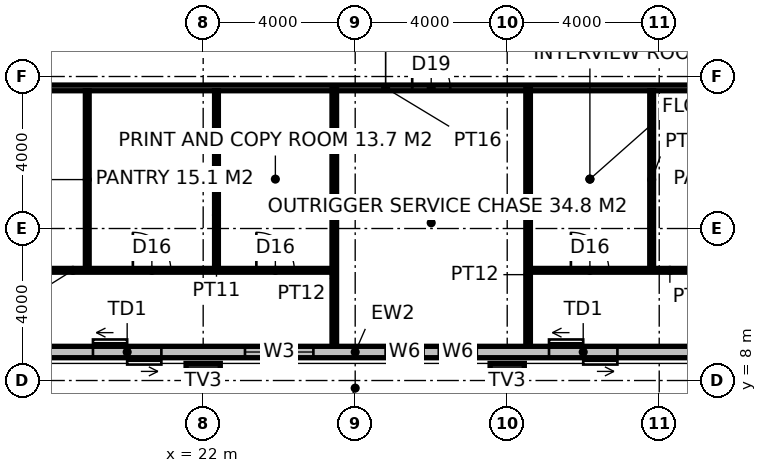
"""IFC4 building model, lengths in metres.
Left out: names, types, materials, properties, quantities, classifications, styles, units other than length and angle.
Written with IfcOpenShell. Run it as: python <this file> out.ifc"""

import sys

from ifc_helpers import new_model, si_unit, direction, frame, frame_2d, origin, origin_2d, place, context, subcontext, project, spatial, rectangle, hollow_rectangle, extrude, element, fill, save


model = new_model("IFC4")
c1 = context("Model", 3, precision=1e-05, world=origin(), true_north=direction((0.0, 1.0)))
c2 = subcontext(c1, "Body", "Model", "MODEL_VIEW")
j1 = project(units=[si_unit("LENGTHUNIT", "METRE"), si_unit("PLANEANGLEUNIT", "RADIAN")], contexts=[c1])
p1 = place(None, origin())
s1 = spatial("IfcSite", under=j1, at=p1, CompositionType="ELEMENT")
p2 = place(p1, origin())
s2 = spatial("IfcBuilding", under=s1, at=p2, CompositionType="ELEMENT")
p3 = place(p2, frame((0.0, 0.0, 171.8)))
s3 = spatial("IfcBuildingStorey", under=s2, at=p3, CompositionType="ELEMENT", Elevation=171.8)
for number, where, z_axis, x_axis in (
    (1, (22.0, 8.0, 0.0), (0.0, 0.0, 1.0), (1.0, 0.0, 0.0)),
    (2, (30.0, 8.0, 0.0), (0.0, 0.0, 1.0), (1.0, 0.0, 0.0)),
):
    element("IfcColumn", number, at=place(p3, frame(where, z_axis=z_axis, x_axis=x_axis)), inside=s3, PredefinedType="USERDEFINED", context=c2, shape_type="SweptSolid", body=[
        extrude(hollow_rectangle(XDim=0.9, YDim=0.9, WallThickness=0.08, at=origin_2d()), origin(), (0.0, 0.0, 1.0), 4.0),
    ])
p4 = place(p3, frame((15.775, 15.7, 0.0), z_axis=(0.0, 0.0, 1.0), x_axis=(1.0, 0.0, 0.0)))
e3 = element("IfcWall", 3, at=p4, inside=s3, PredefinedType="PARTITIONING", context=c2, shape_type="SweptSolid", body=[
    extrude(rectangle(XDim=22.05, YDim=0.15, at=frame_2d((11.025, 0.0))), origin(), (0.0, 0.0, 1.0), 3.85),
])
p5 = place(p4, frame((11.725, 0.0, 0.0)))
e4 = element("IfcOpeningElement", 4, at=p5, cuts=e3, PredefinedType="OPENING", context=c2, shape_type="SweptSolid", body=[
    extrude(rectangle(XDim=1.0, YDim=2.2, at=frame_2d((0.5, 1.1))), frame((0.0, 0.085, 0.0), z_axis=(0.0, -1.0, 0.0), x_axis=(1.0, 0.0, 0.0)), (0.0, 0.0, 1.0), 0.17),
])
for number, where, z_axis, x_axis in (
    (5, (25.45, 8.68, 0.0), (0.0, 0.0, 1.0), (0.0, 1.0, 0.0)),
    (6, (30.55, 8.68, 0.0), (0.0, 0.0, 1.0), (0.0, 1.0, 0.0)),
):
    element("IfcWall", number, at=place(p3, frame(where, z_axis=z_axis, x_axis=x_axis)), inside=s3, PredefinedType="PARTITIONING", context=c2, shape_type="SweptSolid", body=[
        extrude(rectangle(XDim=7.02, YDim=0.12, at=frame_2d((3.51, 0.0))), origin(), (0.0, 0.0, 1.0), 2.65),
    ])
p6 = place(p3, frame((15.65, 10.9, 0.0), z_axis=(0.0, 0.0, 1.0), x_axis=(1.0, 0.0, 0.0)))
e7 = element("IfcWall", 7, at=p6, inside=s3, PredefinedType="PARTITIONING", context=c2, shape_type="SweptSolid", body=[
    extrude(rectangle(XDim=9.739, YDim=0.1, at=frame_2d((4.87, 0.0))), origin(), (0.0, 0.0, 1.0), 3.85),
])
p7 = place(p6, frame((1.175, 0.0, 0.0)))
e8 = element("IfcOpeningElement", 8, at=p7, cuts=e7, PredefinedType="OPENING", context=c2, shape_type="SweptSolid", body=[
    extrude(rectangle(XDim=1.0, YDim=2.2, at=frame_2d((0.5, 1.1))), frame((0.0, 0.06, 0.0), z_axis=(0.0, -1.0, 0.0), x_axis=(1.0, 0.0, 0.0)), (0.0, 0.0, 1.0), 0.12),
])
p8 = place(p6, frame((4.5, 0.0, 0.0)))
e9 = element("IfcOpeningElement", 9, at=p8, cuts=e7, PredefinedType="OPENING", context=c2, shape_type="SweptSolid", body=[
    extrude(rectangle(XDim=1.0, YDim=2.2, at=frame_2d((0.5, 1.1))), frame((0.0, 0.06, 0.0), z_axis=(0.0, -1.0, 0.0), x_axis=(1.0, 0.0, 0.0)), (0.0, 0.0, 1.0), 0.12),
])
p9 = place(p6, frame((7.75, 0.0, 0.0)))
e10 = element("IfcOpeningElement", 10, at=p9, cuts=e7, PredefinedType="OPENING", context=c2, shape_type="SweptSolid", body=[
    extrude(rectangle(XDim=1.0, YDim=2.2, at=frame_2d((0.5, 1.1))), frame((0.0, 0.06, 0.0), z_axis=(0.0, -1.0, 0.0), x_axis=(1.0, 0.0, 0.0)), (0.0, 0.0, 1.0), 0.12),
])
p10 = place(p3, frame((30.611, 10.9, 0.0), z_axis=(0.0, 0.0, 1.0), x_axis=(1.0, 0.0, 0.0)))
e11 = element("IfcWall", 11, at=p10, inside=s3, PredefinedType="PARTITIONING", context=c2, shape_type="SweptSolid", body=[
    extrude(rectangle(XDim=7.339, YDim=0.1, at=frame_2d((3.669, 0.0))), origin(), (0.0, 0.0, 1.0), 3.85),
])
p11 = place(p10, frame((1.065, 0.0, 0.0)))
e12 = element("IfcOpeningElement", 12, at=p11, cuts=e11, PredefinedType="OPENING", context=c2, shape_type="SweptSolid", body=[
    extrude(rectangle(XDim=1.0, YDim=2.2, at=frame_2d((0.5, 1.1))), frame((0.0, 0.06, 0.0), z_axis=(0.0, -1.0, 0.0), x_axis=(1.0, 0.0, 0.0)), (0.0, 0.0, 1.0), 0.12),
])
p12 = place(p10, frame((4.74, 0.0, 0.0)))
e13 = element("IfcOpeningElement", 13, at=p12, cuts=e11, PredefinedType="OPENING", context=c2, shape_type="SweptSolid", body=[
    extrude(rectangle(XDim=1.0, YDim=2.2, at=frame_2d((0.5, 1.1))), frame((0.0, 0.06, 0.0), z_axis=(0.0, -1.0, 0.0), x_axis=(1.0, 0.0, 0.0)), (0.0, 0.0, 1.0), 0.12),
])
p13 = place(p3, frame((18.95, 10.95, 0.0), z_axis=(0.0, 0.0, 1.0), x_axis=(0.0, 1.0, 0.0)))
e14 = element("IfcWall", 14, at=p13, inside=s3, PredefinedType="PARTITIONING", context=c2, shape_type="SweptSolid", body=[
    extrude(rectangle(XDim=4.675, YDim=0.1, at=frame_2d((2.337, 0.0))), origin(), (0.0, 0.0, 1.0), 3.85),
])
for number, where, z_axis, x_axis in (
    (15, (22.35, 10.95, 0.0), (0.0, 0.0, 1.0), (0.0, 1.0, 0.0)),
    (16, (33.801, 10.95, 0.0), (0.0, 0.0, 1.0), (0.0, 1.0, 0.0)),
):
    element("IfcWall", number, at=place(p3, frame(where, z_axis=z_axis, x_axis=x_axis)), inside=s3, PredefinedType="PARTITIONING", context=c2, shape_type="SweptSolid", body=[
        extrude(rectangle(XDim=4.675, YDim=0.1, at=frame_2d((2.337, 0.0))), origin(), (0.0, 0.0, 1.0), 2.65),
    ])
p14 = place(p3, frame((9.6, 8.75, 0.0), z_axis=(0.0, 0.0, 1.0), x_axis=(1.0, 0.0, 0.0)))
e17 = element("IfcWall", 17, at=p14, inside=s3, PredefinedType="ELEMENTEDWALL", context=c2, shape_type="SweptSolid", body=[
    extrude(rectangle(XDim=32.8, YDim=0.3, at=frame_2d((16.4, 0.0))), origin(), (0.0, 0.0, 1.0), 3.85),
])
p15 = place(p14, frame((5.5, 0.0, 0.8)))
e18 = element("IfcOpeningElement", 18, at=p15, cuts=e17, PredefinedType="OPENING", context=c2, shape_type="SweptSolid", body=[
    extrude(rectangle(XDim=1.8, YDim=2.4, at=frame_2d((0.9, 1.2))), frame((0.0, 0.16, 0.0), z_axis=(0.0, -1.0, 0.0), x_axis=(1.0, 0.0, 0.0)), (0.0, 0.0, 1.0), 0.32),
])
p16 = place(p14, frame((9.5, 0.0, 0.0)))
e19 = element("IfcOpeningElement", 19, at=p16, cuts=e17, PredefinedType="OPENING", context=c2, shape_type="SweptSolid", body=[
    extrude(rectangle(XDim=1.8, YDim=2.4, at=frame_2d((0.9, 1.2))), frame((0.0, 0.16, 0.0), z_axis=(0.0, -1.0, 0.0), x_axis=(1.0, 0.0, 0.0)), (0.0, 0.0, 1.0), 0.32),
])
p17 = place(p14, frame((13.5, 0.0, 0.8)))
e20 = element("IfcOpeningElement", 20, at=p17, cuts=e17, PredefinedType="OPENING", context=c2, shape_type="SweptSolid", body=[
    extrude(rectangle(XDim=1.8, YDim=2.4, at=frame_2d((0.9, 1.2))), frame((0.0, 0.16, 0.0), z_axis=(0.0, -1.0, 0.0), x_axis=(1.0, 0.0, 0.0)), (0.0, 0.0, 1.0), 0.32),
])
p18 = place(p14, frame((17.2, 0.0, 0.8)))
e21 = element("IfcOpeningElement", 21, at=p18, cuts=e17, PredefinedType="OPENING", context=c2, shape_type="SweptSolid", body=[
    extrude(rectangle(XDim=1.0, YDim=2.4, at=frame_2d((0.5, 1.2))), frame((0.0, 0.16, 0.0), z_axis=(0.0, -1.0, 0.0), x_axis=(1.0, 0.0, 0.0)), (0.0, 0.0, 1.0), 0.32),
])
p19 = place(p14, frame((18.6, 0.0, 0.8)))
e22 = element("IfcOpeningElement", 22, at=p19, cuts=e17, PredefinedType="OPENING", context=c2, shape_type="SweptSolid", body=[
    extrude(rectangle(XDim=1.0, YDim=2.4, at=frame_2d((0.5, 1.2))), frame((0.0, 0.16, 0.0), z_axis=(0.0, -1.0, 0.0), x_axis=(1.0, 0.0, 0.0)), (0.0, 0.0, 1.0), 0.32),
])
p20 = place(p14, frame((21.5, 0.0, 0.0)))
e23 = element("IfcOpeningElement", 23, at=p20, cuts=e17, PredefinedType="OPENING", context=c2, shape_type="SweptSolid", body=[
    extrude(rectangle(XDim=1.8, YDim=2.4, at=frame_2d((0.9, 1.2))), frame((0.0, 0.16, 0.0), z_axis=(0.0, -1.0, 0.0), x_axis=(1.0, 0.0, 0.0)), (0.0, 0.0, 1.0), 0.32),
])
p21 = place(p14, frame((25.5, 0.0, 0.8)))
e24 = element("IfcOpeningElement", 24, at=p21, cuts=e17, PredefinedType="OPENING", context=c2, shape_type="SweptSolid", body=[
    extrude(rectangle(XDim=1.8, YDim=2.4, at=frame_2d((0.9, 1.2))), frame((0.0, 0.16, 0.0), z_axis=(0.0, -1.0, 0.0), x_axis=(1.0, 0.0, 0.0)), (0.0, 0.0, 1.0), 0.32),
])
p22 = place(p5, origin())
e25 = element("IfcDoor", 25, at=p22, inside=s3, OperationType="SINGLE_SWING_LEFT", PredefinedType="DOOR", context=c2, shape_type="SweptSolid", body=[
    extrude(rectangle(XDim=1.0, YDim=2.2, at=frame_2d((0.5, 1.1))), frame((0.0, 0.025, 0.0), z_axis=(0.0, -1.0, 0.0), x_axis=(1.0, 0.0, 0.0)), (0.0, 0.0, 1.0), 0.05),
])
fill(e4, e25)
p23 = place(p8, origin())
e26 = element("IfcDoor", 26, at=p23, inside=s3, OperationType="SINGLE_SWING_LEFT", PredefinedType="DOOR", context=c2, shape_type="SweptSolid", body=[
    extrude(rectangle(XDim=1.0, YDim=2.2, at=frame_2d((0.5, 1.1))), frame((0.0, 0.025, 0.0), z_axis=(0.0, -1.0, 0.0), x_axis=(1.0, 0.0, 0.0)), (0.0, 0.0, 1.0), 0.05),
])
fill(e9, e26)
p24 = place(p9, origin())
e27 = element("IfcDoor", 27, at=p24, inside=s3, OperationType="SINGLE_SWING_LEFT", PredefinedType="DOOR", context=c2, shape_type="SweptSolid", body=[
    extrude(rectangle(XDim=1.0, YDim=2.2, at=frame_2d((0.5, 1.1))), frame((0.0, 0.025, 0.0), z_axis=(0.0, -1.0, 0.0), x_axis=(1.0, 0.0, 0.0)), (0.0, 0.0, 1.0), 0.05),
])
fill(e10, e27)
p25 = place(p11, origin())
e28 = element("IfcDoor", 28, at=p25, inside=s3, OperationType="SINGLE_SWING_LEFT", PredefinedType="DOOR", context=c2, shape_type="SweptSolid", body=[
    extrude(rectangle(XDim=1.0, YDim=2.2, at=frame_2d((0.5, 1.1))), frame((0.0, 0.025, 0.0), z_axis=(0.0, -1.0, 0.0), x_axis=(1.0, 0.0, 0.0)), (0.0, 0.0, 1.0), 0.05),
])
fill(e12, e28)
p26 = place(p16, origin())
e29 = element("IfcDoor", 29, at=p26, inside=s3, OperationType="DOUBLE_DOOR_SLIDING", PredefinedType="DOOR", context=c2, shape_type="SweptSolid", body=[
    extrude(rectangle(XDim=1.8, YDim=2.4, at=frame_2d((0.9, 1.2))), frame((0.0, 0.025, 0.0), z_axis=(0.0, -1.0, 0.0), x_axis=(1.0, 0.0, 0.0)), (0.0, 0.0, 1.0), 0.05),
])
fill(e19, e29)
p27 = place(p17, origin())
e30 = element("IfcWindow", 30, at=p27, inside=s3, PartitioningType="SINGLE_PANEL", PredefinedType="WINDOW", context=c2, shape_type="SweptSolid", body=[
    extrude(rectangle(XDim=1.8, YDim=2.4, at=frame_2d((0.9, 1.2))), frame((0.0, 0.03, 0.0), z_axis=(0.0, -1.0, 0.0), x_axis=(1.0, 0.0, 0.0)), (0.0, 0.0, 1.0), 0.06),
])
fill(e20, e30)
p28 = place(p18, origin())
e31 = element("IfcWindow", 31, at=p28, inside=s3, PartitioningType="SINGLE_PANEL", PredefinedType="WINDOW", context=c2, shape_type="SweptSolid", body=[
    extrude(rectangle(XDim=1.0, YDim=2.4, at=frame_2d((0.5, 1.2))), frame((0.0, 0.03, 0.0), z_axis=(0.0, -1.0, 0.0), x_axis=(1.0, 0.0, 0.0)), (0.0, 0.0, 1.0), 0.06),
])
fill(e21, e31)
p29 = place(p19, origin())
e32 = element("IfcWindow", 32, at=p29, inside=s3, PartitioningType="SINGLE_PANEL", PredefinedType="WINDOW", context=c2, shape_type="SweptSolid", body=[
    extrude(rectangle(XDim=1.0, YDim=2.4, at=frame_2d((0.5, 1.2))), frame((0.0, 0.03, 0.0), z_axis=(0.0, -1.0, 0.0), x_axis=(1.0, 0.0, 0.0)), (0.0, 0.0, 1.0), 0.06),
])
fill(e22, e32)
p30 = place(p20, origin())
e33 = element("IfcDoor", 33, at=p30, inside=s3, OperationType="DOUBLE_DOOR_SLIDING", PredefinedType="DOOR", context=c2, shape_type="SweptSolid", body=[
    extrude(rectangle(XDim=1.8, YDim=2.4, at=frame_2d((0.9, 1.2))), frame((0.0, 0.025, 0.0), z_axis=(0.0, -1.0, 0.0), x_axis=(1.0, 0.0, 0.0)), (0.0, 0.0, 1.0), 0.05),
])
fill(e23, e33)
save(model, sys.argv[1])
